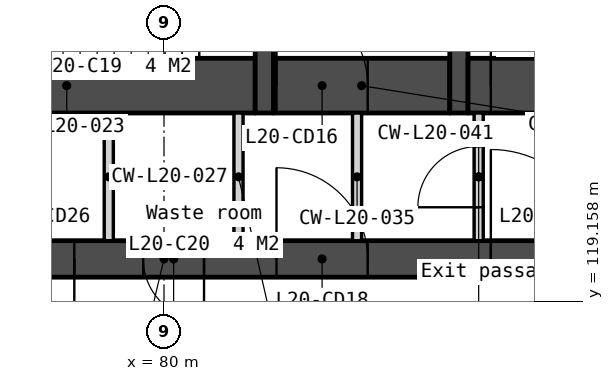
"""IFC4 building model, lengths in metres.
Left out: names, types, materials, properties, quantities, classifications, styles, units other than length and angle.
Written with IfcOpenShell. Run it as: python <this file> out.ifc"""

import sys

from ifc_helpers import new_model, si_unit, direction, frame, frame_2d, origin, place, context, subcontext, project, spatial, polyline, rectangle, outline, extrude, element, fill, save


model = new_model("IFC4")
c1 = context("Model", 3, precision=1e-05, world=origin(), true_north=direction((0.0, 1.0)))
c2 = subcontext(c1, "Body", "Model", "MODEL_VIEW")
j1 = project(units=[si_unit("LENGTHUNIT", "METRE"), si_unit("PLANEANGLEUNIT", "RADIAN")], contexts=[c1])
p1 = place(None, origin())
s1 = spatial("IfcSite", under=j1, at=p1, CompositionType="ELEMENT")
p2 = place(p1, origin())
s2 = spatial("IfcBuilding", under=s1, at=p2, CompositionType="ELEMENT")
p3 = place(p2, frame((0.0, 0.0, 85.3)))
s3 = spatial("IfcBuildingStorey", under=s2, at=p3, CompositionType="ELEMENT", Elevation=85.3)
p4 = place(p3, frame((66.0, 119.85, 0.0), z_axis=(0.0, 0.0, 1.0), x_axis=(1.0, 0.0, 0.0)))
e1 = element("IfcWall", 1, at=p4, inside=s3, PredefinedType="SOLIDWALL", context=c2, shape_type="SweptSolid", body=[
    extrude(rectangle(XDim=28.0, YDim=0.6, at=frame_2d((14.0, 0.0))), origin(), (0.0, 0.0, 1.0), 3.35),
])
p5 = place(p4, frame((6.825, 0.0, 0.0)))
e2 = element("IfcOpeningElement", 2, at=p5, cuts=e1, PredefinedType="OPENING", context=c2, shape_type="SweptSolid", body=[
    extrude(rectangle(XDim=1.8, YDim=2.1, at=frame_2d((0.9, 1.05))), frame((0.0, 0.31, 0.0), z_axis=(0.0, -1.0, 0.0), x_axis=(1.0, 0.0, 0.0)), (0.0, 0.0, 1.0), 0.62),
])
p6 = place(p4, frame((15.85, 0.0, 0.0)))
e3 = element("IfcOpeningElement", 3, at=p6, cuts=e1, PredefinedType="OPENING", context=c2, shape_type="SweptSolid", body=[
    extrude(rectangle(XDim=1.5, YDim=2.1, at=frame_2d((0.75, 1.05))), frame((0.0, 0.31, 0.0), z_axis=(0.0, -1.0, 0.0), x_axis=(1.0, 0.0, 0.0)), (0.0, 0.0, 1.0), 0.62),
])
p7 = place(p4, frame((19.375, 0.0, 0.0)))
e4 = element("IfcOpeningElement", 4, at=p7, cuts=e1, PredefinedType="OPENING", context=c2, shape_type="SweptSolid", body=[
    extrude(rectangle(XDim=1.8, YDim=2.1, at=frame_2d((0.9, 1.05))), frame((0.0, 0.31, 0.0), z_axis=(0.0, -1.0, 0.0), x_axis=(1.0, 0.0, 0.0)), (0.0, 0.0, 1.0), 0.62),
])
p8 = place(p4, frame((4.425, 0.0, 0.0)))
e5 = element("IfcOpeningElement", 5, at=p8, cuts=e1, PredefinedType="OPENING", context=c2, shape_type="SweptSolid", body=[
    extrude(rectangle(XDim=1.0, YDim=2.1, at=frame_2d((0.5, 1.05))), frame((0.0, 0.31, 0.0), z_axis=(0.0, -1.0, 0.0), x_axis=(1.0, 0.0, 0.0)), (0.0, 0.0, 1.0), 0.62),
])
p9 = place(p4, frame((9.783, 0.0, 0.0)))
e6 = element("IfcOpeningElement", 6, at=p9, cuts=e1, PredefinedType="OPENING", context=c2, shape_type="SweptSolid", body=[
    extrude(rectangle(XDim=1.0, YDim=2.1, at=frame_2d((0.5, 1.05))), frame((0.0, 0.31, 0.0), z_axis=(0.0, -1.0, 0.0), x_axis=(1.0, 0.0, 0.0)), (0.0, 0.0, 1.0), 0.62),
])
p10 = place(p4, frame((11.525, 0.0, 0.0)))
e7 = element("IfcOpeningElement", 7, at=p10, cuts=e1, PredefinedType="OPENING", context=c2, shape_type="SweptSolid", body=[
    extrude(rectangle(XDim=1.0, YDim=2.1, at=frame_2d((0.5, 1.05))), frame((0.0, 0.31, 0.0), z_axis=(0.0, -1.0, 0.0), x_axis=(1.0, 0.0, 0.0)), (0.0, 0.0, 1.0), 0.62),
])
p11 = place(p4, frame((13.658, 0.0, 0.0)))
e8 = element("IfcOpeningElement", 8, at=p11, cuts=e1, PredefinedType="OPENING", context=c2, shape_type="SweptSolid", body=[
    extrude(rectangle(XDim=1.0, YDim=2.1, at=frame_2d((0.5, 1.05))), frame((0.0, 0.31, 0.0), z_axis=(0.0, -1.0, 0.0), x_axis=(1.0, 0.0, 0.0)), (0.0, 0.0, 1.0), 0.62),
])
p12 = place(p4, frame((21.725, 0.0, 0.0)))
e9 = element("IfcOpeningElement", 9, at=p12, cuts=e1, PredefinedType="OPENING", context=c2, shape_type="SweptSolid", body=[
    extrude(rectangle(XDim=1.0, YDim=2.1, at=frame_2d((0.5, 1.05))), frame((0.0, 0.31, 0.0), z_axis=(0.0, -1.0, 0.0), x_axis=(1.0, 0.0, 0.0)), (0.0, 0.0, 1.0), 0.62),
])
p13 = place(p4, frame((23.425, 0.0, 0.0)))
e10 = element("IfcOpeningElement", 10, at=p13, cuts=e1, PredefinedType="OPENING", context=c2, shape_type="SweptSolid", body=[
    extrude(rectangle(XDim=1.0, YDim=2.1, at=frame_2d((0.5, 1.05))), frame((0.0, 0.31, 0.0), z_axis=(0.0, -1.0, 0.0), x_axis=(1.0, 0.0, 0.0)), (0.0, 0.0, 1.0), 0.62),
])
p14 = place(p3, frame((75.3, 122.7, 0.0), z_axis=(0.0, 0.0, 1.0), x_axis=(1.0, 0.0, 0.0)))
e11 = element("IfcWall", 11, at=p14, inside=s3, PredefinedType="SOLIDWALL", context=c2, shape_type="SweptSolid", body=[
    extrude(rectangle(XDim=6.2, YDim=0.9, at=frame_2d((3.1, 0.0))), origin(), (0.0, 0.0, 1.0), 3.35),
])
for number, where, z_axis, x_axis in (
    (12, (79.092, 122.25, 0.0), (0.0, 0.0, 1.0), (0.0, -1.0, 0.0)),
    (13, (81.225, 122.25, 0.0), (0.0, 0.0, 1.0), (0.0, -1.0, 0.0)),
):
    element("IfcWall", number, at=place(p3, frame(where, z_axis=z_axis, x_axis=x_axis)), inside=s3, PredefinedType="PARTITIONING", context=c2, shape_type="SweptSolid", body=[
        extrude(rectangle(XDim=2.1, YDim=0.15, at=frame_2d((1.05, 0.0))), origin(), (0.0, 0.0, 1.0), 3.35),
    ])
p15 = place(p3, frame((81.65, 125.7, 0.0), z_axis=(0.0, 0.0, 1.0), x_axis=(0.0, -1.0, 0.0)))
e14 = element("IfcWall", 14, at=p15, inside=s3, PredefinedType="SOLIDWALL", context=c2, shape_type="SweptSolid", body=[
    extrude(rectangle(XDim=3.45, YDim=0.3, at=frame_2d((1.725, 0.0))), origin(), (0.0, 0.0, 1.0), 3.35),
])
p16 = place(p15, frame((0.75, 0.0, 0.0)))
e15 = element("IfcOpeningElement", 15, at=p16, cuts=e14, PredefinedType="OPENING", context=c2, shape_type="SweptSolid", body=[
    extrude(rectangle(XDim=1.0, YDim=2.1, at=frame_2d((0.5, 1.05))), frame((0.0, 0.16, 0.0), z_axis=(0.0, -1.0, 0.0), x_axis=(1.0, 0.0, 0.0)), (0.0, 0.0, 1.0), 0.32),
])
p17 = place(p3, frame((81.8, 122.7, 0.0), z_axis=(0.0, 0.0, 1.0), x_axis=(1.0, 0.0, 0.0)))
e16 = element("IfcWall", 16, at=p17, inside=s3, PredefinedType="SOLIDWALL", context=c2, shape_type="SweptSolid", body=[
    extrude(rectangle(XDim=2.9, YDim=0.9, at=frame_2d((1.45, 0.0))), origin(), (0.0, 0.0, 1.0), 3.35),
])
p18 = place(p17, frame((0.05, 0.0, 0.0)))
e17 = element("IfcOpeningElement", 17, at=p18, cuts=e16, PredefinedType="OPENING", context=c2, shape_type="SweptSolid", body=[
    extrude(rectangle(XDim=1.5, YDim=2.1, at=frame_2d((0.75, 1.05))), frame((0.0, 0.46, 0.0), z_axis=(0.0, -1.0, 0.0), x_axis=(1.0, 0.0, 0.0)), (0.0, 0.0, 1.0), 0.92),
])
p19 = place(p3, frame((83.175, 122.25, 0.0), z_axis=(0.0, 0.0, 1.0), x_axis=(0.0, -1.0, 0.0)))
e18 = element("IfcWall", 18, at=p19, inside=s3, PredefinedType="PARTITIONING", context=c2, shape_type="SweptSolid", body=[
    extrude(rectangle(XDim=2.1, YDim=0.15, at=frame_2d((1.05, 0.0))), origin(), (0.0, 0.0, 1.0), 3.35),
])
p20 = place(p3, frame((84.85, 133.95, 0.0), z_axis=(0.0, 0.0, 1.0), x_axis=(0.0, -1.0, 0.0)))
e19 = element("IfcWall", 19, at=p20, inside=s3, PredefinedType="SOLIDWALL", context=c2, shape_type="SweptSolid", body=[
    extrude(rectangle(XDim=11.7, YDim=0.3, at=frame_2d((5.85, 0.0))), origin(), (0.0, 0.0, 1.0), 3.35),
])
p21 = place(p3, frame((85.0, 122.7, 0.0), z_axis=(0.0, 0.0, 1.0), x_axis=(1.0, 0.0, 0.0)))
e20 = element("IfcWall", 20, at=p21, inside=s3, PredefinedType="SOLIDWALL", context=c2, shape_type="SweptSolid", body=[
    extrude(rectangle(XDim=2.55, YDim=0.9, at=frame_2d((1.275, 0.0))), origin(), (0.0, 0.0, 1.0), 3.35),
])
p22 = place(p21, frame((0.375, 0.0, 0.0)))
e21 = element("IfcOpeningElement", 21, at=p22, cuts=e20, PredefinedType="OPENING", context=c2, shape_type="SweptSolid", body=[
    extrude(rectangle(XDim=1.8, YDim=2.1, at=frame_2d((0.9, 1.05))), frame((0.0, 0.46, 0.0), z_axis=(0.0, -1.0, 0.0), x_axis=(1.0, 0.0, 0.0)), (0.0, 0.0, 1.0), 0.92),
])
p23 = place(p3, frame((85.175, 122.25, 0.0), z_axis=(0.0, 0.0, 1.0), x_axis=(0.0, -1.0, 0.0)))
e22 = element("IfcWall", 22, at=p23, inside=s3, PredefinedType="PARTITIONING", context=c2, shape_type="SweptSolid", body=[
    extrude(rectangle(XDim=2.1, YDim=0.15, at=frame_2d((1.05, 0.0))), origin(), (0.0, 0.0, 1.0), 3.35),
])
p24 = place(p23, frame((0.55, 0.0, 0.0)))
e23 = element("IfcOpeningElement", 23, at=p24, cuts=e22, PredefinedType="OPENING", context=c2, shape_type="SweptSolid", body=[
    extrude(rectangle(XDim=1.0, YDim=2.1, at=frame_2d((0.5, 1.05))), frame((0.0, 0.085, 0.0), z_axis=(0.0, -1.0, 0.0), x_axis=(1.0, 0.0, 0.0)), (0.0, 0.0, 1.0), 0.17),
])
p25 = place(p3, frame((82.605, 93.333, -0.15), z_axis=(0.0, 0.0, 1.0), x_axis=(0.500000478905, 0.866025127289, 0.0)))
e24 = element("IfcWall", 24, at=p25, inside=s3, PredefinedType="SOLIDWALL", context=c2, shape_type="SweptSolid", body=[
    extrude(outline(polyline([(42.643, 0.0), (42.643, 3.5), (0.0, 3.5), (0.0, 0.0), (42.643, 0.0)])), frame((0.0, 0.225, 0.0), z_axis=(0.0, -1.0, 0.0), x_axis=(1.0, 0.0, 0.0)), (0.0, 0.0, 1.0), 0.45),
])
p26 = place(p25, frame((7.079, 0.0, 1.05)))
e25 = element("IfcOpeningElement", 25, at=p26, cuts=e24, PredefinedType="OPENING", context=c2, shape_type="SweptSolid", body=[
    extrude(rectangle(XDim=1.2, YDim=1.5, at=frame_2d((0.6, 0.75))), frame((0.0, 0.235, 0.0), z_axis=(0.0, -1.0, 0.0), x_axis=(1.0, 0.0, 0.0)), (0.0, 0.0, 1.0), 0.47),
])
p27 = place(p25, frame((8.779, 0.0, 1.05)))
e26 = element("IfcOpeningElement", 26, at=p27, cuts=e24, PredefinedType="OPENING", context=c2, shape_type="SweptSolid", body=[
    extrude(rectangle(XDim=1.2, YDim=1.5, at=frame_2d((0.6, 0.75))), frame((0.0, 0.235, 0.0), z_axis=(0.0, -1.0, 0.0), x_axis=(1.0, 0.0, 0.0)), (0.0, 0.0, 1.0), 0.47),
])
p28 = place(p25, frame((15.607, 0.0, 1.05)))
e27 = element("IfcOpeningElement", 27, at=p28, cuts=e24, PredefinedType="OPENING", context=c2, shape_type="SweptSolid", body=[
    extrude(rectangle(XDim=1.2, YDim=1.5, at=frame_2d((0.6, 0.75))), frame((0.0, 0.235, 0.0), z_axis=(0.0, -1.0, 0.0), x_axis=(1.0, 0.0, 0.0)), (0.0, 0.0, 1.0), 0.47),
])
p29 = place(p25, frame((17.307, 0.0, 1.05)))
e28 = element("IfcOpeningElement", 28, at=p29, cuts=e24, PredefinedType="OPENING", context=c2, shape_type="SweptSolid", body=[
    extrude(rectangle(XDim=1.2, YDim=1.5, at=frame_2d((0.6, 0.75))), frame((0.0, 0.235, 0.0), z_axis=(0.0, -1.0, 0.0), x_axis=(1.0, 0.0, 0.0)), (0.0, 0.0, 1.0), 0.47),
])
p30 = place(p25, frame((24.136, 0.0, 1.05)))
e29 = element("IfcOpeningElement", 29, at=p30, cuts=e24, PredefinedType="OPENING", context=c2, shape_type="SweptSolid", body=[
    extrude(rectangle(XDim=1.2, YDim=1.5, at=frame_2d((0.6, 0.75))), frame((0.0, 0.235, 0.0), z_axis=(0.0, -1.0, 0.0), x_axis=(1.0, 0.0, 0.0)), (0.0, 0.0, 1.0), 0.47),
])
p31 = place(p25, frame((25.836, 0.0, 1.05)))
e30 = element("IfcOpeningElement", 30, at=p31, cuts=e24, PredefinedType="OPENING", context=c2, shape_type="SweptSolid", body=[
    extrude(rectangle(XDim=1.2, YDim=1.5, at=frame_2d((0.6, 0.75))), frame((0.0, 0.235, 0.0), z_axis=(0.0, -1.0, 0.0), x_axis=(1.0, 0.0, 0.0)), (0.0, 0.0, 1.0), 0.47),
])
p32 = place(p25, frame((32.665, 0.0, 1.05)))
e31 = element("IfcOpeningElement", 31, at=p32, cuts=e24, PredefinedType="OPENING", context=c2, shape_type="SweptSolid", body=[
    extrude(rectangle(XDim=1.2, YDim=1.5, at=frame_2d((0.6, 0.75))), frame((0.0, 0.235, 0.0), z_axis=(0.0, -1.0, 0.0), x_axis=(1.0, 0.0, 0.0)), (0.0, 0.0, 1.0), 0.47),
])
p33 = place(p25, frame((34.365, 0.0, 1.05)))
e32 = element("IfcOpeningElement", 32, at=p33, cuts=e24, PredefinedType="OPENING", context=c2, shape_type="SweptSolid", body=[
    extrude(rectangle(XDim=1.2, YDim=1.5, at=frame_2d((0.6, 0.75))), frame((0.0, 0.235, 0.0), z_axis=(0.0, -1.0, 0.0), x_axis=(1.0, 0.0, 0.0)), (0.0, 0.0, 1.0), 0.47),
])
p34 = place(p22, origin())
e33 = element("IfcDoor", 33, at=p34, inside=s3, OperationType="DOUBLE_DOOR_DOUBLE_SWING", PredefinedType="DOOR", context=c2, shape_type="SweptSolid", body=[
    extrude(rectangle(XDim=1.8, YDim=2.1, at=frame_2d((0.9, 1.05))), frame((0.0, 0.025, 0.0), z_axis=(0.0, -1.0, 0.0), x_axis=(1.0, 0.0, 0.0)), (0.0, 0.0, 1.0), 0.05),
])
fill(e21, e33)
p35 = place(p18, origin())
e34 = element("IfcDoor", 34, at=p35, inside=s3, OperationType="DOUBLE_DOOR_DOUBLE_SWING", PredefinedType="DOOR", context=c2, shape_type="SweptSolid", body=[
    extrude(rectangle(XDim=1.5, YDim=2.1, at=frame_2d((0.75, 1.05))), frame((0.0, 0.025, 0.0), z_axis=(0.0, -1.0, 0.0), x_axis=(1.0, 0.0, 0.0)), (0.0, 0.0, 1.0), 0.05),
])
fill(e17, e34)
p36 = place(p6, origin())
e35 = element("IfcDoor", 35, at=p36, inside=s3, OperationType="DOUBLE_DOOR_DOUBLE_SWING", PredefinedType="DOOR", context=c2, shape_type="SweptSolid", body=[
    extrude(rectangle(XDim=1.5, YDim=2.1, at=frame_2d((0.75, 1.05))), frame((0.0, 0.025, 0.0), z_axis=(0.0, -1.0, 0.0), x_axis=(1.0, 0.0, 0.0)), (0.0, 0.0, 1.0), 0.05),
])
fill(e3, e35)
p37 = place(p7, origin())
e36 = element("IfcDoor", 36, at=p37, inside=s3, OperationType="DOUBLE_DOOR_DOUBLE_SWING", PredefinedType="DOOR", context=c2, shape_type="SweptSolid", body=[
    extrude(rectangle(XDim=1.8, YDim=2.1, at=frame_2d((0.9, 1.05))), frame((0.0, 0.025, 0.0), z_axis=(0.0, -1.0, 0.0), x_axis=(1.0, 0.0, 0.0)), (0.0, 0.0, 1.0), 0.05),
])
fill(e4, e36)
p38 = place(p10, origin())
e37 = element("IfcDoor", 37, at=p38, inside=s3, OperationType="SINGLE_SWING_RIGHT", PredefinedType="DOOR", context=c2, shape_type="SweptSolid", body=[
    extrude(rectangle(XDim=1.0, YDim=2.1, at=frame_2d((0.5, 1.05))), frame((0.0, 0.025, 0.0), z_axis=(0.0, -1.0, 0.0), x_axis=(1.0, 0.0, 0.0)), (0.0, 0.0, 1.0), 0.05),
])
fill(e7, e37)
p39 = place(p11, origin())
e38 = element("IfcDoor", 38, at=p39, inside=s3, OperationType="SINGLE_SWING_RIGHT", PredefinedType="DOOR", context=c2, shape_type="SweptSolid", body=[
    extrude(rectangle(XDim=1.0, YDim=2.1, at=frame_2d((0.5, 1.05))), frame((0.0, 0.025, 0.0), z_axis=(0.0, -1.0, 0.0), x_axis=(1.0, 0.0, 0.0)), (0.0, 0.0, 1.0), 0.05),
])
fill(e8, e38)
p40 = place(p24, origin())
e39 = element("IfcDoor", 39, at=p40, inside=s3, OperationType="SINGLE_SWING_RIGHT", PredefinedType="DOOR", context=c2, shape_type="SweptSolid", body=[
    extrude(rectangle(XDim=1.0, YDim=2.1, at=frame_2d((0.5, 1.05))), frame((0.0, 0.025, 0.0), z_axis=(0.0, -1.0, 0.0), x_axis=(1.0, 0.0, 0.0)), (0.0, 0.0, 1.0), 0.05),
])
fill(e23, e39)
save(model, sys.argv[1])
